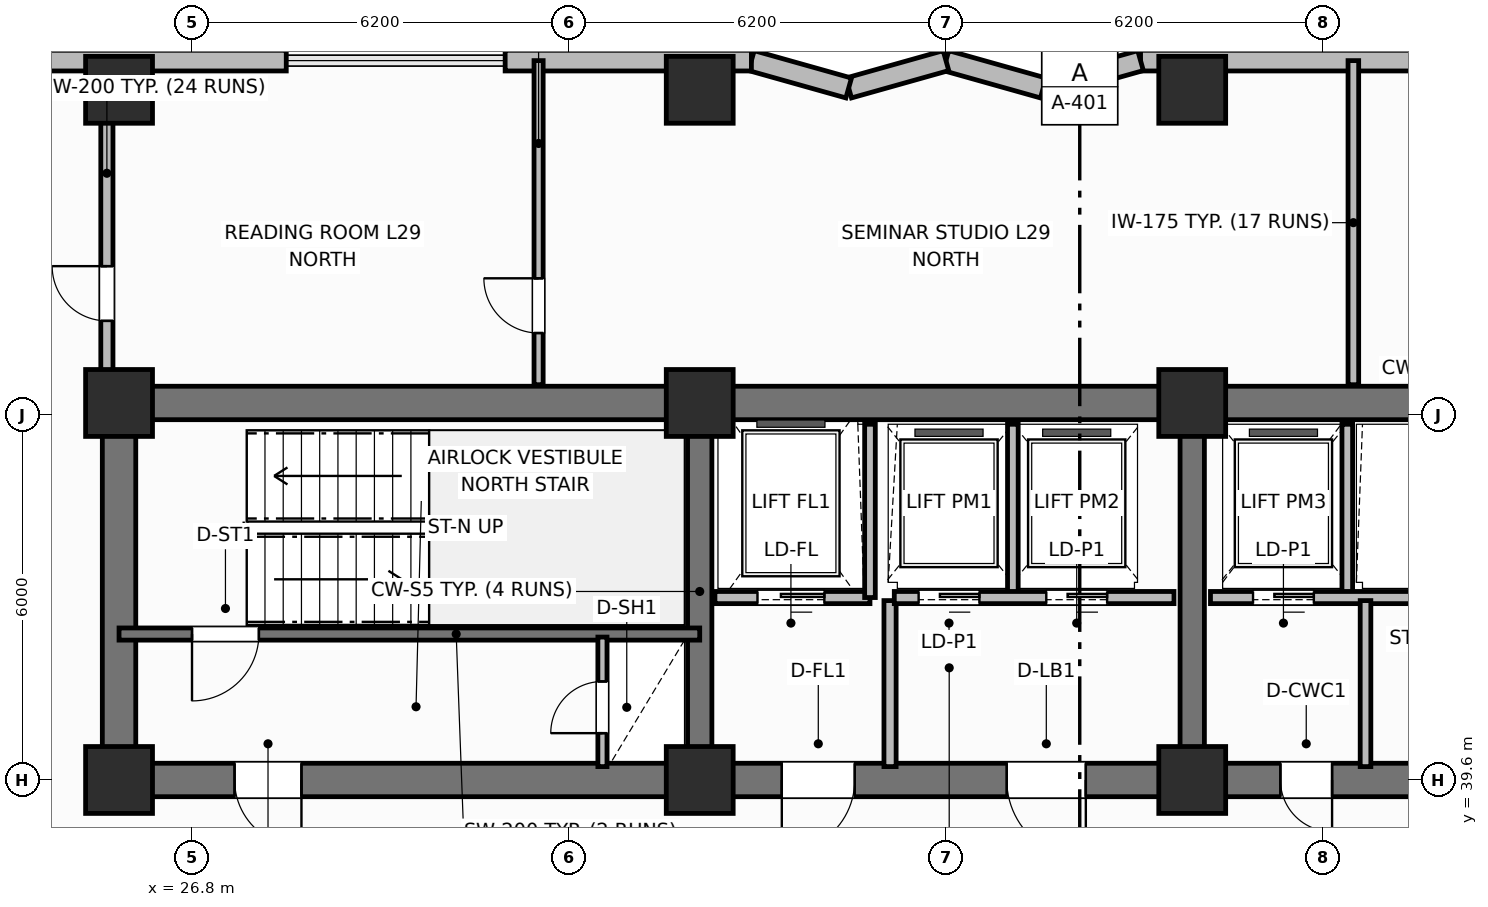
"""IFC4 building model, lengths in metres.
Left out: names, types, materials, properties, quantities, classifications, styles, units other than length and angle.
Written with IfcOpenShell. Run it as: python <this file> out.ifc"""

import sys

from ifc_helpers import new_model, si_unit, direction, frame, frame_2d, origin, origin_2d, place, context, subcontext, project, spatial, rectangle, extrude, element, fill, save


model = new_model("IFC4")
c1 = context("Model", 3, precision=1e-05, world=origin(), true_north=direction((0.0, 1.0)))
c2 = subcontext(c1, "Body", "Model", "MODEL_VIEW")
j1 = project(units=[si_unit("LENGTHUNIT", "METRE"), si_unit("PLANEANGLEUNIT", "RADIAN")], contexts=[c1])
p1 = place(None, origin())
s1 = spatial("IfcSite", under=j1, at=p1, CompositionType="ELEMENT")
p2 = place(p1, origin())
s2 = spatial("IfcBuilding", under=s1, at=p2, CompositionType="ELEMENT")
p3 = place(p2, frame((0.0, 0.0, 117.9)))
s3 = spatial("IfcBuildingStorey", under=s2, at=p3, CompositionType="ELEMENT", Elevation=117.9)
p4 = place(p3, frame((25.6, 45.8, 0.0), z_axis=(0.0, 0.0, 1.0), x_axis=(1.0, 0.0, 0.0)))
e1 = element("IfcWall", 1, at=p4, inside=s3, PredefinedType="SHEAR", context=c2, shape_type="SweptSolid", body=[
    extrude(rectangle(XDim=27.2, YDim=0.55, at=frame_2d((13.6, 0.0))), origin(), (0.0, 0.0, 1.0), 3.7),
])
p5 = place(p3, frame((25.6, 39.875, 0.0), z_axis=(0.0, 0.0, 1.0), x_axis=(0.0, 1.0, 0.0)))
e2 = element("IfcWall", 2, at=p5, inside=s3, PredefinedType="SHEAR", context=c2, shape_type="SweptSolid", body=[
    extrude(rectangle(XDim=5.65, YDim=0.55, at=frame_2d((2.825, 0.0))), origin(), (0.0, 0.0, 1.0), 3.7),
])
p6 = place(p3, frame((52.8, 39.6, 0.0), z_axis=(0.0, 0.0, 1.0), x_axis=(-1.0, 0.0, 0.0)))
e3 = element("IfcWall", 3, at=p6, inside=s3, PredefinedType="SHEAR", context=c2, shape_type="SweptSolid", body=[
    extrude(rectangle(XDim=27.2, YDim=0.55, at=frame_2d((13.6, 0.0))), origin(), (0.0, 0.0, 1.0), 3.7),
])
p7 = place(p6, frame((24.2, 0.0, 0.0)))
e4 = element("IfcOpeningElement", 4, at=p7, cuts=e3, PredefinedType="OPENING", context=c2, shape_type="SweptSolid", body=[
    extrude(rectangle(XDim=1.1, YDim=2.15, at=frame_2d((0.55, 1.075))), frame((0.0, 0.285, 0.0), z_axis=(0.0, -1.0, 0.0), x_axis=(1.0, 0.0, 0.0)), (0.0, 0.0, 1.0), 0.57),
])
p8 = place(p6, frame((15.1, 0.0, 0.0)))
e5 = element("IfcOpeningElement", 5, at=p8, cuts=e3, PredefinedType="OPENING", context=c2, shape_type="SweptSolid", body=[
    extrude(rectangle(XDim=1.2, YDim=2.15, at=frame_2d((0.6, 1.075))), frame((0.0, 0.285, 0.0), z_axis=(0.0, -1.0, 0.0), x_axis=(1.0, 0.0, 0.0)), (0.0, 0.0, 1.0), 0.57),
])
p9 = place(p6, frame((11.3, 0.0, 0.0)))
e6 = element("IfcOpeningElement", 6, at=p9, cuts=e3, PredefinedType="OPENING", context=c2, shape_type="SweptSolid", body=[
    extrude(rectangle(XDim=1.3, YDim=2.2, at=frame_2d((0.65, 1.1))), frame((0.0, 0.285, 0.0), z_axis=(0.0, -1.0, 0.0), x_axis=(1.0, 0.0, 0.0)), (0.0, 0.0, 1.0), 0.57),
])
p10 = place(p6, frame((7.25, 0.0, 0.0)))
e7 = element("IfcOpeningElement", 7, at=p10, cuts=e3, PredefinedType="OPENING", context=c2, shape_type="SweptSolid", body=[
    extrude(rectangle(XDim=0.85, YDim=2.1, at=frame_2d((0.425, 1.05))), frame((0.0, 0.285, 0.0), z_axis=(0.0, -1.0, 0.0), x_axis=(1.0, 0.0, 0.0)), (0.0, 0.0, 1.0), 0.57),
])
p11 = place(p6, frame((3.0, 0.0, 0.0)))
e8 = element("IfcOpeningElement", 8, at=p11, cuts=e3, PredefinedType="OPENING", context=c2, shape_type="SweptSolid", body=[
    extrude(rectangle(XDim=0.9, YDim=2.1, at=frame_2d((0.45, 1.05))), frame((0.0, 0.285, 0.0), z_axis=(0.0, -1.0, 0.0), x_axis=(1.0, 0.0, 0.0)), (0.0, 0.0, 1.0), 0.57),
])
for number, where, z_axis, x_axis in (
    (9, (35.15, 39.875, 0.0), (0.0, 0.0, 1.0), (0.0, 1.0, 0.0)),
    (10, (43.25, 39.875, 0.0), (0.0, 0.0, 1.0), (0.0, 1.0, 0.0)),
):
    element("IfcWall", number, at=place(p3, frame(where, z_axis=z_axis, x_axis=x_axis)), inside=s3, PredefinedType="SHEAR", context=c2, shape_type="SweptSolid", body=[
        extrude(rectangle(XDim=5.65, YDim=0.4, at=frame_2d((2.825, 0.0))), origin(), (0.0, 0.0, 1.0), 3.7),
    ])
for number, where, z_axis, x_axis in (
    (11, (25.6, 39.6, 0.0), (0.0, 0.0, 1.0), (1.0, 0.0, 0.0)),
    (12, (25.6, 45.8, 0.0), (0.0, 0.0, 1.0), (1.0, 0.0, 0.0)),
    (13, (35.15, 39.6, 0.0), (0.0, 0.0, 1.0), (1.0, 0.0, 0.0)),
    (14, (35.15, 45.8, 0.0), (0.0, 0.0, 1.0), (1.0, 0.0, 0.0)),
    (15, (43.25, 39.6, 0.0), (0.0, 0.0, 1.0), (1.0, 0.0, 0.0)),
    (16, (43.25, 45.8, 0.0), (0.0, 0.0, 1.0), (1.0, 0.0, 0.0)),
    (17, (25.6, 50.95, 0.0), (0.0, 0.0, 1.0), (1.0, 0.0, 0.0)),
    (18, (35.15, 50.95, 0.0), (0.0, 0.0, 1.0), (1.0, 0.0, 0.0)),
    (19, (43.25, 50.95, 0.0), (0.0, 0.0, 1.0), (1.0, 0.0, 0.0)),
):
    element("IfcColumn", number, at=place(p3, frame(where, z_axis=z_axis, x_axis=x_axis)), inside=s3, PredefinedType="COLUMN", context=c2, shape_type="SweptSolid", body=[
        extrude(rectangle(XDim=1.1, YDim=1.1, at=origin_2d()), origin(), (0.0, 0.0, 1.0), 3.7),
    ])
p12 = place(p3, frame((55.35, 51.43, 0.0), z_axis=(0.0, 0.0, 1.0), x_axis=(-1.0, 0.0, 0.0)))
e20 = element("IfcWall", 20, at=p12, inside=s3, PredefinedType="SOLIDWALL", context=c2, shape_type="SweptSolid", body=[
    extrude(rectangle(XDim=12.95, YDim=0.34, at=frame_2d((6.475, 0.0))), origin(), (0.0, 0.0, 1.0), 2.7),
])
p13 = place(p12, frame((5.775, 0.0, 0.73)))
e21 = element("IfcOpeningElement", 21, at=p13, cuts=e20, PredefinedType="OPENING", context=c2, shape_type="SweptSolid", body=[
    extrude(rectangle(XDim=1.4, YDim=1.85, at=frame_2d((0.7, 0.925))), frame((0.0, 0.18, 0.0), z_axis=(0.0, -1.0, 0.0), x_axis=(1.0, 0.0, 0.0)), (0.0, 0.0, 1.0), 0.36),
])
p14 = place(p3, frame((42.4, 51.43, 0.0), z_axis=(0.0, 0.0, 1.0), x_axis=(-0.962652136636, -0.270741322725, 0.0)))
e22 = element("IfcWall", 22, at=p14, inside=s3, PredefinedType="SOLIDWALL", context=c2, shape_type="SweptSolid", body=[
    extrude(rectangle(XDim=1.662, YDim=0.34, at=frame_2d((0.831, 0.0))), origin(), (0.0, 0.0, 1.0), 2.7),
])
p15 = place(p3, frame((40.8, 50.98, 0.0), z_axis=(0.0, 0.0, 1.0), x_axis=(-0.962662902433, 0.270703040766, 0.0)))
e23 = element("IfcWall", 23, at=p15, inside=s3, PredefinedType="SOLIDWALL", context=c2, shape_type="SweptSolid", body=[
    extrude(rectangle(XDim=1.662, YDim=0.34, at=frame_2d((0.831, 0.0))), origin(), (0.0, 0.0, 1.0), 2.7),
])
p16 = place(p3, frame((39.2, 51.43, 0.0), z_axis=(0.0, 0.0, 1.0), x_axis=(-0.962652136636, -0.270741322725, 0.0)))
e24 = element("IfcWall", 24, at=p16, inside=s3, PredefinedType="SOLIDWALL", context=c2, shape_type="SweptSolid", body=[
    extrude(rectangle(XDim=1.662, YDim=0.34, at=frame_2d((0.831, 0.0))), origin(), (0.0, 0.0, 1.0), 2.7),
])
p17 = place(p3, frame((37.6, 50.98, 0.0), z_axis=(0.0, 0.0, 1.0), x_axis=(-0.962662902433, 0.270703040766, 0.0)))
e25 = element("IfcWall", 25, at=p17, inside=s3, PredefinedType="SOLIDWALL", context=c2, shape_type="SweptSolid", body=[
    extrude(rectangle(XDim=1.662, YDim=0.34, at=frame_2d((0.831, 0.0))), origin(), (0.0, 0.0, 1.0), 2.7),
])
p18 = place(p3, frame((36.0, 51.43, 0.0), z_axis=(0.0, 0.0, 1.0), x_axis=(-1.0, 0.0, 0.0)))
e26 = element("IfcWall", 26, at=p18, inside=s3, PredefinedType="SOLIDWALL", context=c2, shape_type="SweptSolid", body=[
    extrude(rectangle(XDim=4.05, YDim=0.34, at=frame_2d((2.025, 0.0))), origin(), (0.0, 0.0, 1.0), 2.7),
])
p19 = place(p3, frame((28.35, 51.43, 0.0), z_axis=(0.0, 0.0, 1.0), x_axis=(-1.0, 0.0, 0.0)))
e27 = element("IfcWall", 27, at=p19, inside=s3, PredefinedType="SOLIDWALL", context=c2, shape_type="SweptSolid", body=[
    extrude(rectangle(XDim=9.75, YDim=0.34, at=frame_2d((4.875, 0.0))), origin(), (0.0, 0.0, 1.0), 2.7),
])
p20 = place(p19, frame((6.992, 0.0, 0.73)))
e28 = element("IfcOpeningElement", 28, at=p20, cuts=e27, PredefinedType="OPENING", context=c2, shape_type="SweptSolid", body=[
    extrude(rectangle(XDim=1.4, YDim=1.85, at=frame_2d((0.7, 0.925))), frame((0.0, 0.18, 0.0), z_axis=(0.0, -1.0, 0.0), x_axis=(1.0, 0.0, 0.0)), (0.0, 0.0, 1.0), 0.36),
])
p21 = place(p3, frame((35.15, 42.0, 0.0), z_axis=(0.0, 0.0, 1.0), x_axis=(-1.0, 0.0, 0.0)))
e29 = element("IfcWall", 29, at=p21, inside=s3, PredefinedType="SHEAR", context=c2, shape_type="SweptSolid", body=[
    extrude(rectangle(XDim=9.55, YDim=0.2, at=frame_2d((4.775, 0.0))), origin(), (0.0, 0.0, 1.0), 3.7),
])
p22 = place(p21, frame((7.25, 0.0, 0.0)))
e30 = element("IfcOpeningElement", 30, at=p22, cuts=e29, PredefinedType="OPENING", context=c2, shape_type="SweptSolid", body=[
    extrude(rectangle(XDim=1.1, YDim=2.15, at=frame_2d((0.55, 1.075))), frame((0.0, 0.11, 0.0), z_axis=(0.0, -1.0, 0.0), x_axis=(1.0, 0.0, 0.0)), (0.0, 0.0, 1.0), 0.22),
])
p23 = place(p3, frame((33.55, 39.82, 0.0), z_axis=(0.0, 0.0, 1.0), x_axis=(0.0, 1.0, 0.0)))
e31 = element("IfcWall", 31, at=p23, inside=s3, PredefinedType="PARTITIONING", context=c2, shape_type="SweptSolid", body=[
    extrude(rectangle(XDim=2.13, YDim=0.15, at=frame_2d((1.065, 0.0))), origin(), (0.0, 0.0, 1.0), 2.53),
])
p24 = place(p23, frame((0.55, 0.0, 0.0)))
e32 = element("IfcOpeningElement", 32, at=p24, cuts=e31, PredefinedType="OPENING", context=c2, shape_type="SweptSolid", body=[
    extrude(rectangle(XDim=0.85, YDim=2.05, at=frame_2d((0.425, 1.025))), frame((0.0, 0.085, 0.0), z_axis=(0.0, -1.0, 0.0), x_axis=(1.0, 0.0, 0.0)), (0.0, 0.0, 1.0), 0.17),
])
p25 = place(p3, frame((37.95, 42.6, 0.0), z_axis=(0.0, 0.0, 1.0), x_axis=(-1.0, 0.0, 0.0)))
e33 = element("IfcWall", 33, at=p25, inside=s3, PredefinedType="PARTITIONING", context=c2, shape_type="SweptSolid", body=[
    extrude(rectangle(XDim=2.55, YDim=0.2, at=frame_2d((1.275, 0.0))), origin(), (0.0, 0.0, 1.0), 2.3),
])
p26 = place(p25, frame((0.75, 0.0, 0.0)))
e34 = element("IfcOpeningElement", 34, at=p26, cuts=e33, PredefinedType="OPENING", context=c2, shape_type="SweptSolid", body=[
    extrude(rectangle(XDim=1.1, YDim=2.15, at=frame_2d((0.55, 1.075))), frame((0.0, 0.11, 0.0), z_axis=(0.0, -1.0, 0.0), x_axis=(1.0, 0.0, 0.0)), (0.0, 0.0, 1.0), 0.22),
])
p27 = place(p3, frame((37.95, 42.6, 0.0), z_axis=(0.0, 0.0, 1.0), x_axis=(0.0, 1.0, 0.0)))
e35 = element("IfcWall", 35, at=p27, inside=s3, PredefinedType="PARTITIONING", context=c2, shape_type="SweptSolid", body=[
    extrude(rectangle(XDim=2.85, YDim=0.175, at=frame_2d((1.425, 0.0))), origin(), (0.0, 0.0, 1.0), 2.53),
])
p28 = place(p3, frame((38.28, 39.82, 0.0), z_axis=(0.0, 0.0, 1.0), x_axis=(0.0, 1.0, 0.0)))
e36 = element("IfcWall", 36, at=p28, inside=s3, PredefinedType="PARTITIONING", context=c2, shape_type="SweptSolid", body=[
    extrude(rectangle(XDim=2.73, YDim=0.2, at=frame_2d((1.365, 0.0))), origin(), (0.0, 0.0, 1.0), 2.53),
])
p29 = place(p3, frame((40.3, 42.65, 0.0), z_axis=(0.0, 0.0, 1.0), x_axis=(0.0, 1.0, 0.0)))
e37 = element("IfcWall", 37, at=p29, inside=s3, PredefinedType="PARTITIONING", context=c2, shape_type="SweptSolid", body=[
    extrude(rectangle(XDim=2.8, YDim=0.175, at=frame_2d((1.4, 0.0))), origin(), (0.0, 0.0, 1.0), 2.53),
])
p30 = place(p3, frame((42.95, 42.6, 0.0), z_axis=(0.0, 0.0, 1.0), x_axis=(-1.0, 0.0, 0.0)))
e38 = element("IfcWall", 38, at=p30, inside=s3, PredefinedType="PARTITIONING", context=c2, shape_type="SweptSolid", body=[
    extrude(rectangle(XDim=4.6, YDim=0.2, at=frame_2d((2.3, 0.0))), origin(), (0.0, 0.0, 1.0), 2.3),
])
p31 = place(p30, frame((3.2, 0.0, 0.0)))
e39 = element("IfcOpeningElement", 39, at=p31, cuts=e38, PredefinedType="OPENING", context=c2, shape_type="SweptSolid", body=[
    extrude(rectangle(XDim=1.0, YDim=2.15, at=frame_2d((0.5, 1.075))), frame((0.0, 0.11, 0.0), z_axis=(0.0, -1.0, 0.0), x_axis=(1.0, 0.0, 0.0)), (0.0, 0.0, 1.0), 0.22),
])
p32 = place(p30, frame((1.1, 0.0, 0.0)))
e40 = element("IfcOpeningElement", 40, at=p32, cuts=e38, PredefinedType="OPENING", context=c2, shape_type="SweptSolid", body=[
    extrude(rectangle(XDim=1.0, YDim=2.15, at=frame_2d((0.5, 1.075))), frame((0.0, 0.11, 0.0), z_axis=(0.0, -1.0, 0.0), x_axis=(1.0, 0.0, 0.0)), (0.0, 0.0, 1.0), 0.22),
])
p33 = place(p3, frame((45.8, 42.65, 0.0), z_axis=(0.0, 0.0, 1.0), x_axis=(0.0, 1.0, 0.0)))
e41 = element("IfcWall", 41, at=p33, inside=s3, PredefinedType="PARTITIONING", context=c2, shape_type="SweptSolid", body=[
    extrude(rectangle(XDim=2.8, YDim=0.175, at=frame_2d((1.4, 0.0))), origin(), (0.0, 0.0, 1.0), 2.53),
])
p34 = place(p3, frame((52.35, 42.6, 0.0), z_axis=(0.0, 0.0, 1.0), x_axis=(-1.0, 0.0, 0.0)))
e42 = element("IfcWall", 42, at=p34, inside=s3, PredefinedType="PARTITIONING", context=c2, shape_type="SweptSolid", body=[
    extrude(rectangle(XDim=8.8, YDim=0.2, at=frame_2d((4.4, 0.0))), origin(), (0.0, 0.0, 1.0), 2.53),
])
p35 = place(p34, frame((7.1, 0.0, 0.0)))
e43 = element("IfcOpeningElement", 43, at=p35, cuts=e42, PredefinedType="OPENING", context=c2, shape_type="SweptSolid", body=[
    extrude(rectangle(XDim=1.0, YDim=2.15, at=frame_2d((0.5, 1.075))), frame((0.0, 0.11, 0.0), z_axis=(0.0, -1.0, 0.0), x_axis=(1.0, 0.0, 0.0)), (0.0, 0.0, 1.0), 0.22),
])
p36 = place(p3, frame((46.1, 39.82, 0.0), z_axis=(0.0, 0.0, 1.0), x_axis=(0.0, 1.0, 0.0)))
e44 = element("IfcWall", 44, at=p36, inside=s3, PredefinedType="PARTITIONING", context=c2, shape_type="SweptSolid", body=[
    extrude(rectangle(XDim=2.73, YDim=0.175, at=frame_2d((1.365, 0.0))), origin(), (0.0, 0.0, 1.0), 2.53),
])
p37 = place(p3, frame((32.5, 46.1, 0.0), z_axis=(0.0, 0.0, 1.0), x_axis=(0.0, 1.0, 0.0)))
e45 = element("IfcWall", 45, at=p37, inside=s3, PredefinedType="PARTITIONING", context=c2, shape_type="SweptSolid", body=[
    extrude(rectangle(XDim=5.33, YDim=0.15, at=frame_2d((2.665, 0.0))), origin(), (0.0, 0.0, 1.0), 2.53),
])
p38 = place(p37, frame((0.85, 0.0, 0.0)))
e46 = element("IfcOpeningElement", 46, at=p38, cuts=e45, PredefinedType="OPENING", context=c2, shape_type="SweptSolid", body=[
    extrude(rectangle(XDim=0.9, YDim=2.1, at=frame_2d((0.45, 1.05))), frame((0.0, 0.085, 0.0), z_axis=(0.0, -1.0, 0.0), x_axis=(1.0, 0.0, 0.0)), (0.0, 0.0, 1.0), 0.17),
])
p39 = place(p3, frame((45.9, 46.1, 0.0), z_axis=(0.0, 0.0, 1.0), x_axis=(0.0, 1.0, 0.0)))
e47 = element("IfcWall", 47, at=p39, inside=s3, PredefinedType="PARTITIONING", context=c2, shape_type="SweptSolid", body=[
    extrude(rectangle(XDim=5.33, YDim=0.175, at=frame_2d((2.665, 0.0))), origin(), (0.0, 0.0, 1.0), 2.53),
])
p40 = place(p3, frame((25.4, 46.1, 0.0), z_axis=(0.0, 0.0, 1.0), x_axis=(0.0, 1.0, 0.0)))
e48 = element("IfcWall", 48, at=p40, inside=s3, PredefinedType="PARTITIONING", context=c2, shape_type="SweptSolid", body=[
    extrude(rectangle(XDim=4.53, YDim=0.2, at=frame_2d((2.265, 0.0))), origin(), (0.0, 0.0, 1.0), 2.53),
])
p41 = place(p40, frame((1.05, 0.0, 0.0)))
e49 = element("IfcOpeningElement", 49, at=p41, cuts=e48, PredefinedType="OPENING", context=c2, shape_type="SweptSolid", body=[
    extrude(rectangle(XDim=0.9, YDim=2.1, at=frame_2d((0.45, 1.05))), frame((0.0, 0.11, 0.0), z_axis=(0.0, -1.0, 0.0), x_axis=(1.0, 0.0, 0.0)), (0.0, 0.0, 1.0), 0.22),
])
p42 = place(p22, origin())
e50 = element("IfcDoor", 50, at=p42, inside=s3, OperationType="SINGLE_SWING_RIGHT", PredefinedType="DOOR", context=c2, shape_type="SweptSolid", body=[
    extrude(rectangle(XDim=1.1, YDim=2.15, at=frame_2d((0.55, 1.075))), frame((0.0, 0.025, 0.0), z_axis=(0.0, -1.0, 0.0), x_axis=(1.0, 0.0, 0.0)), (0.0, 0.0, 1.0), 0.05),
])
fill(e30, e50)
p43 = place(p24, origin())
e51 = element("IfcDoor", 51, at=p43, inside=s3, OperationType="SINGLE_SWING_LEFT", PredefinedType="TRAPDOOR", context=c2, shape_type="SweptSolid", body=[
    extrude(rectangle(XDim=0.85, YDim=2.05, at=frame_2d((0.425, 1.025))), frame((0.0, 0.025, 0.0), z_axis=(0.0, -1.0, 0.0), x_axis=(1.0, 0.0, 0.0)), (0.0, 0.0, 1.0), 0.05),
])
fill(e32, e51)
p44 = place(p26, origin())
e52 = element("IfcDoor", 52, at=p44, inside=s3, OperationType="SLIDING_TO_LEFT", PredefinedType="DOOR", context=c2, shape_type="SweptSolid", body=[
    extrude(rectangle(XDim=1.1, YDim=2.15, at=frame_2d((0.55, 1.075))), frame((0.0, 0.025, 0.0), z_axis=(0.0, -1.0, 0.0), x_axis=(1.0, 0.0, 0.0)), (0.0, 0.0, 1.0), 0.05),
])
fill(e34, e52)
p45 = place(p31, origin())
e53 = element("IfcDoor", 53, at=p45, inside=s3, OperationType="SLIDING_TO_LEFT", PredefinedType="DOOR", context=c2, shape_type="SweptSolid", body=[
    extrude(rectangle(XDim=1.0, YDim=2.15, at=frame_2d((0.5, 1.075))), frame((0.0, 0.025, 0.0), z_axis=(0.0, -1.0, 0.0), x_axis=(1.0, 0.0, 0.0)), (0.0, 0.0, 1.0), 0.05),
])
fill(e39, e53)
p46 = place(p32, origin())
e54 = element("IfcDoor", 54, at=p46, inside=s3, OperationType="SLIDING_TO_LEFT", PredefinedType="DOOR", context=c2, shape_type="SweptSolid", body=[
    extrude(rectangle(XDim=1.0, YDim=2.15, at=frame_2d((0.5, 1.075))), frame((0.0, 0.025, 0.0), z_axis=(0.0, -1.0, 0.0), x_axis=(1.0, 0.0, 0.0)), (0.0, 0.0, 1.0), 0.05),
])
fill(e40, e54)
p47 = place(p35, origin())
e55 = element("IfcDoor", 55, at=p47, inside=s3, OperationType="SLIDING_TO_LEFT", PredefinedType="DOOR", context=c2, shape_type="SweptSolid", body=[
    extrude(rectangle(XDim=1.0, YDim=2.15, at=frame_2d((0.5, 1.075))), frame((0.0, 0.025, 0.0), z_axis=(0.0, -1.0, 0.0), x_axis=(1.0, 0.0, 0.0)), (0.0, 0.0, 1.0), 0.05),
])
fill(e43, e55)
p48 = place(p38, origin())
e56 = element("IfcDoor", 56, at=p48, inside=s3, OperationType="SINGLE_SWING_RIGHT", PredefinedType="DOOR", context=c2, shape_type="SweptSolid", body=[
    extrude(rectangle(XDim=0.9, YDim=2.1, at=frame_2d((0.45, 1.05))), frame((0.0, 0.025, 0.0), z_axis=(0.0, -1.0, 0.0), x_axis=(1.0, 0.0, 0.0)), (0.0, 0.0, 1.0), 0.05),
])
fill(e46, e56)
p49 = place(p41, origin())
e57 = element("IfcDoor", 57, at=p49, inside=s3, OperationType="SINGLE_SWING_RIGHT", PredefinedType="DOOR", context=c2, shape_type="SweptSolid", body=[
    extrude(rectangle(XDim=0.9, YDim=2.1, at=frame_2d((0.45, 1.05))), frame((0.0, 0.025, 0.0), z_axis=(0.0, -1.0, 0.0), x_axis=(1.0, 0.0, 0.0)), (0.0, 0.0, 1.0), 0.05),
])
fill(e49, e57)
p50 = place(p7, origin())
e58 = element("IfcDoor", 58, at=p50, inside=s3, OperationType="SINGLE_SWING_LEFT", PredefinedType="DOOR", context=c2, shape_type="SweptSolid", body=[
    extrude(rectangle(XDim=1.1, YDim=2.15, at=frame_2d((0.55, 1.075))), frame((0.0, 0.025, 0.0), z_axis=(0.0, -1.0, 0.0), x_axis=(1.0, 0.0, 0.0)), (0.0, 0.0, 1.0), 0.05),
])
fill(e4, e58)
p51 = place(p8, origin())
e59 = element("IfcDoor", 59, at=p51, inside=s3, OperationType="SINGLE_SWING_RIGHT", PredefinedType="DOOR", context=c2, shape_type="SweptSolid", body=[
    extrude(rectangle(XDim=1.2, YDim=2.15, at=frame_2d((0.6, 1.075))), frame((0.0, 0.025, 0.0), z_axis=(0.0, -1.0, 0.0), x_axis=(1.0, 0.0, 0.0)), (0.0, 0.0, 1.0), 0.05),
])
fill(e5, e59)
p52 = place(p9, origin())
e60 = element("IfcDoor", 60, at=p52, inside=s3, OperationType="SINGLE_SWING_LEFT", PredefinedType="DOOR", context=c2, shape_type="SweptSolid", body=[
    extrude(rectangle(XDim=1.3, YDim=2.2, at=frame_2d((0.65, 1.1))), frame((0.0, 0.025, 0.0), z_axis=(0.0, -1.0, 0.0), x_axis=(1.0, 0.0, 0.0)), (0.0, 0.0, 1.0), 0.05),
])
fill(e6, e60)
p53 = place(p10, origin())
e61 = element("IfcDoor", 61, at=p53, inside=s3, OperationType="SINGLE_SWING_LEFT", PredefinedType="DOOR", context=c2, shape_type="SweptSolid", body=[
    extrude(rectangle(XDim=0.85, YDim=2.1, at=frame_2d((0.425, 1.05))), frame((0.0, 0.025, 0.0), z_axis=(0.0, -1.0, 0.0), x_axis=(1.0, 0.0, 0.0)), (0.0, 0.0, 1.0), 0.05),
])
fill(e7, e61)
save(model, sys.argv[1])
